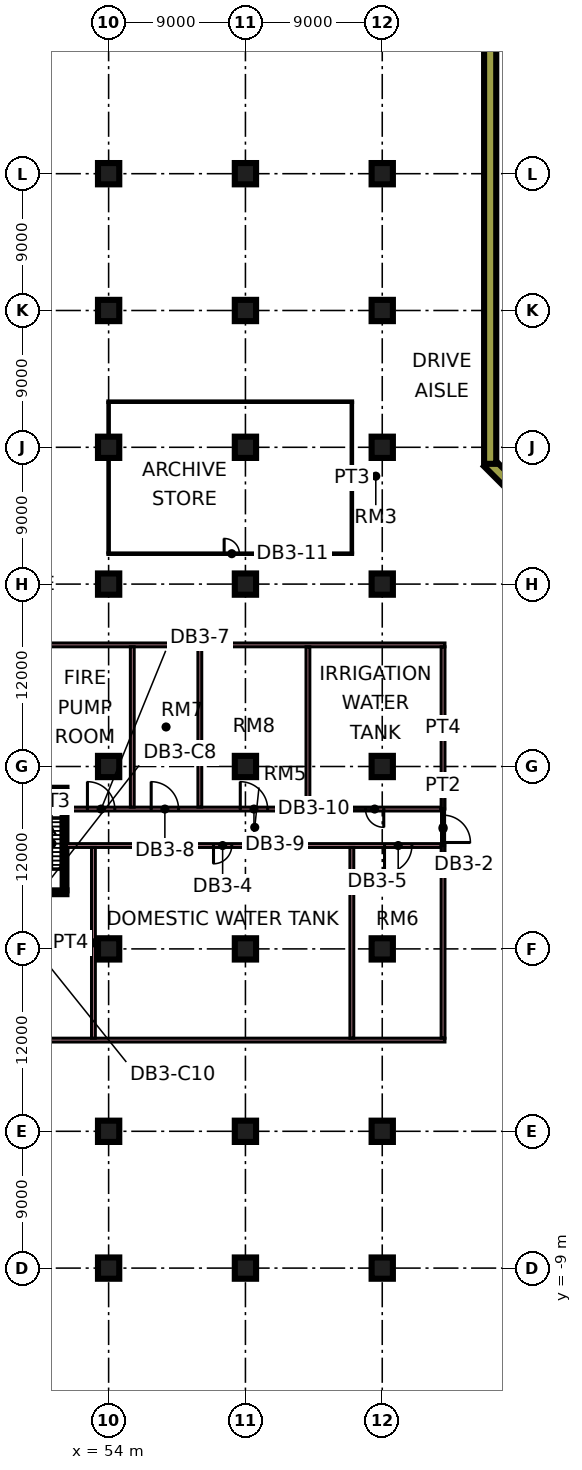
"""IFC4 building model, lengths in metres.
Left out: names, types, materials, properties, quantities, classifications, styles, units other than length and angle.
Written with IfcOpenShell. Run it as: python <this file> out.ifc"""

import sys

from ifc_helpers import new_model, si_unit, direction, frame, frame_2d, origin, origin_2d, place, context, subcontext, project, spatial, rectangle, extrude, element, fill, save


model = new_model("IFC4")
c1 = context("Model", 3, precision=1e-05, world=origin(), true_north=direction((0.0, 1.0)))
c2 = subcontext(c1, "Body", "Model", "MODEL_VIEW")
j1 = project(units=[si_unit("LENGTHUNIT", "METRE"), si_unit("PLANEANGLEUNIT", "RADIAN")], contexts=[c1])
p1 = place(None, origin())
s1 = spatial("IfcSite", under=j1, at=p1, CompositionType="ELEMENT")
p2 = place(p1, origin())
s2 = spatial("IfcBuilding", under=s1, at=p2, CompositionType="ELEMENT")
p3 = place(p2, frame((0.0, 0.0, -13.5)))
s3 = spatial("IfcBuildingStorey", under=s2, at=p3, CompositionType="ELEMENT", Elevation=-13.5)
for number, where, z_axis, x_axis in (
    (1, (54.0, -9.0, 0.0), (0.0, 0.0, 1.0), (1.0, 0.0, 0.0)),
    (2, (54.0, 0.0, 0.0), (0.0, 0.0, 1.0), (1.0, 0.0, 0.0)),
    (3, (54.0, 12.0, 0.0), (0.0, 0.0, 1.0), (1.0, 0.0, 0.0)),
    (4, (54.0, 24.0, 0.0), (0.0, 0.0, 1.0), (1.0, 0.0, 0.0)),
    (5, (54.0, 36.0, 0.0), (0.0, 0.0, 1.0), (1.0, 0.0, 0.0)),
    (6, (54.0, 45.0, 0.0), (0.0, 0.0, 1.0), (1.0, 0.0, 0.0)),
    (7, (54.0, 54.0, 0.0), (0.0, 0.0, 1.0), (1.0, 0.0, 0.0)),
    (8, (54.0, 63.0, 0.0), (0.0, 0.0, 1.0), (1.0, 0.0, 0.0)),
    (9, (63.0, -9.0, 0.0), (0.0, 0.0, 1.0), (1.0, 0.0, 0.0)),
    (10, (63.0, 0.0, 0.0), (0.0, 0.0, 1.0), (1.0, 0.0, 0.0)),
    (11, (63.0, 12.0, 0.0), (0.0, 0.0, 1.0), (1.0, 0.0, 0.0)),
    (12, (63.0, 24.0, 0.0), (0.0, 0.0, 1.0), (1.0, 0.0, 0.0)),
    (13, (63.0, 36.0, 0.0), (0.0, 0.0, 1.0), (1.0, 0.0, 0.0)),
    (14, (63.0, 45.0, 0.0), (0.0, 0.0, 1.0), (1.0, 0.0, 0.0)),
    (15, (63.0, 54.0, 0.0), (0.0, 0.0, 1.0), (1.0, 0.0, 0.0)),
    (16, (63.0, 63.0, 0.0), (0.0, 0.0, 1.0), (1.0, 0.0, 0.0)),
    (17, (72.0, -9.0, 0.0), (0.0, 0.0, 1.0), (1.0, 0.0, 0.0)),
    (18, (72.0, 0.0, 0.0), (0.0, 0.0, 1.0), (1.0, 0.0, 0.0)),
    (19, (72.0, 12.0, 0.0), (0.0, 0.0, 1.0), (1.0, 0.0, 0.0)),
    (20, (72.0, 24.0, 0.0), (0.0, 0.0, 1.0), (1.0, 0.0, 0.0)),
    (21, (72.0, 36.0, 0.0), (0.0, 0.0, 1.0), (1.0, 0.0, 0.0)),
    (22, (72.0, 45.0, 0.0), (0.0, 0.0, 1.0), (1.0, 0.0, 0.0)),
    (23, (72.0, 54.0, 0.0), (0.0, 0.0, 1.0), (1.0, 0.0, 0.0)),
    (24, (72.0, 63.0, 0.0), (0.0, 0.0, 1.0), (1.0, 0.0, 0.0)),
):
    element("IfcColumn", number, at=place(p3, frame(where, z_axis=z_axis, x_axis=x_axis)), inside=s3, PredefinedType="COLUMN", context=c2, shape_type="SweptSolid", body=[
        extrude(rectangle(XDim=1.4, YDim=1.4, at=origin_2d()), origin(), (0.0, 0.0, 1.0), 4.5),
    ])
p4 = place(p3, frame((47.775, 15.725, 0.0), z_axis=(0.0, 0.0, 1.0), x_axis=(1.0, 0.0, 0.0)))
e25 = element("IfcWall", 25, at=p4, inside=s3, PredefinedType="SHEAR", context=c2, shape_type="SweptSolid", body=[
    extrude(rectangle(XDim=3.45, YDim=0.25, at=frame_2d((1.725, 0.0))), origin(), (0.0, 0.0, 1.0), 4.5),
])
p5 = place(p4, frame((1.175, 0.0, 0.0)))
e26 = element("IfcOpeningElement", 26, at=p5, cuts=e25, PredefinedType="OPENING", context=c2, shape_type="SweptSolid", body=[
    extrude(rectangle(XDim=1.1, YDim=2.2, at=frame_2d((0.55, 1.1))), frame((0.0, 0.135, 0.0), z_axis=(0.0, -1.0, 0.0), x_axis=(1.0, 0.0, 0.0)), (0.0, 0.0, 1.0), 0.27),
])
p6 = place(p3, frame((47.775, 22.475, 0.0), z_axis=(0.0, 0.0, 1.0), x_axis=(1.0, 0.0, 0.0)))
e27 = element("IfcWall", 27, at=p6, inside=s3, PredefinedType="SHEAR", context=c2, shape_type="SweptSolid", body=[
    extrude(rectangle(XDim=3.45, YDim=0.25, at=frame_2d((1.725, 0.0))), origin(), (0.0, 0.0, 1.0), 4.5),
])
p7 = place(p3, frame((51.1, 15.85, 0.0), z_axis=(0.0, 0.0, 1.0), x_axis=(0.0, 1.0, 0.0)))
e28 = element("IfcWall", 28, at=p7, inside=s3, PredefinedType="SHEAR", context=c2, shape_type="SweptSolid", body=[
    extrude(rectangle(XDim=6.5, YDim=0.25, at=frame_2d((3.25, 0.0))), origin(), (0.0, 0.0, 1.0), 4.5),
])
p8 = place(p3, frame((78.294, -20.717, 0.0), z_axis=(0.0, 0.0, 1.0), x_axis=(0.707112814855, 0.707100747466, 0.0)))
e29 = element("IfcWall", 29, at=p8, inside=s3, PredefinedType="SOLIDWALL", context=c2, shape_type="SweptSolid", body=[
    extrude(rectangle(XDim=20.231, YDim=0.8, at=frame_2d((10.116, 0.0))), origin(), (0.0, 0.0, 1.0), 4.5),
])
p9 = place(p3, frame((92.717, 30.294, 0.0), z_axis=(0.0, 0.0, 1.0), x_axis=(-0.707106781187, 0.707106781187, 0.0)))
e30 = element("IfcWall", 30, at=p9, inside=s3, PredefinedType="SOLIDWALL", context=c2, shape_type="SweptSolid", body=[
    extrude(rectangle(XDim=19.423, YDim=0.8, at=frame_2d((9.712, 0.0))), origin(), (0.0, 0.0, 1.0), 4.5),
])
p10 = place(p3, frame((79.1, 43.912, 0.0), z_axis=(0.0, 0.0, 1.0), x_axis=(0.0, 1.0, 0.0)))
e31 = element("IfcWall", 31, at=p10, inside=s3, PredefinedType="SOLIDWALL", context=c2, shape_type="SweptSolid", body=[
    extrude(rectangle(XDim=35.188, YDim=0.8, at=frame_2d((17.594, 0.0))), origin(), (0.0, 0.0, 1.0), 4.5),
])
p11 = place(p3, frame((35.875, 32.0, 0.0), z_axis=(0.0, 0.0, 1.0), x_axis=(1.0, 0.0, 0.0)))
e32 = element("IfcWall", 32, at=p11, inside=s3, PredefinedType="PARTITIONING", context=c2, shape_type="SweptSolid", body=[
    extrude(rectangle(XDim=40.25, YDim=0.25, at=frame_2d((20.125, 0.0))), origin(), (0.0, 0.0, 1.0), 4.05),
])
p12 = place(p3, frame((40.65, 6.0, 0.0), z_axis=(0.0, 0.0, 1.0), x_axis=(1.0, 0.0, 0.0)))
e33 = element("IfcWall", 33, at=p12, inside=s3, PredefinedType="PARTITIONING", context=c2, shape_type="SweptSolid", body=[
    extrude(rectangle(XDim=35.475, YDim=0.25, at=frame_2d((17.738, 0.0))), origin(), (0.0, 0.0, 1.0), 4.05),
])
p13 = place(p3, frame((51.225, 18.8, 0.0), z_axis=(0.0, 0.0, 1.0), x_axis=(1.0, 0.0, 0.0)))
e34 = element("IfcWall", 34, at=p13, inside=s3, PredefinedType="PARTITIONING", context=c2, shape_type="SweptSolid", body=[
    extrude(rectangle(XDim=24.65, YDim=0.25, at=frame_2d((12.325, 0.0))), origin(), (0.0, 0.0, 1.0), 4.05),
])
p14 = place(p13, frame((9.675, 0.0, 0.0)))
e35 = element("IfcOpeningElement", 35, at=p14, cuts=e34, PredefinedType="OPENING", context=c2, shape_type="SweptSolid", body=[
    extrude(rectangle(XDim=1.2, YDim=2.1, at=frame_2d((0.6, 1.05))), frame((0.0, 0.135, 0.0), z_axis=(0.0, -1.0, 0.0), x_axis=(1.0, 0.0, 0.0)), (0.0, 0.0, 1.0), 0.27),
])
p15 = place(p13, frame((20.925, 0.0, 0.0)))
e36 = element("IfcOpeningElement", 36, at=p15, cuts=e34, PredefinedType="OPENING", context=c2, shape_type="SweptSolid", body=[
    extrude(rectangle(XDim=1.8, YDim=2.1, at=frame_2d((0.9, 1.05))), frame((0.0, 0.135, 0.0), z_axis=(0.0, -1.0, 0.0), x_axis=(1.0, 0.0, 0.0)), (0.0, 0.0, 1.0), 0.27),
])
p16 = place(p3, frame((51.225, 21.2, 0.0), z_axis=(0.0, 0.0, 1.0), x_axis=(1.0, 0.0, 0.0)))
e37 = element("IfcWall", 37, at=p16, inside=s3, PredefinedType="PARTITIONING", context=c2, shape_type="SweptSolid", body=[
    extrude(rectangle(XDim=24.65, YDim=0.25, at=frame_2d((12.325, 0.0))), origin(), (0.0, 0.0, 1.0), 4.05),
])
p17 = place(p16, frame((1.381, 0.0, 0.0)))
e38 = element("IfcOpeningElement", 38, at=p17, cuts=e37, PredefinedType="OPENING", context=c2, shape_type="SweptSolid", body=[
    extrude(rectangle(XDim=1.8, YDim=2.1, at=frame_2d((0.9, 1.05))), frame((0.0, 0.135, 0.0), z_axis=(0.0, -1.0, 0.0), x_axis=(1.0, 0.0, 0.0)), (0.0, 0.0, 1.0), 0.27),
])
p18 = place(p16, frame((5.575, 0.0, 0.0)))
e39 = element("IfcOpeningElement", 39, at=p18, cuts=e37, PredefinedType="OPENING", context=c2, shape_type="SweptSolid", body=[
    extrude(rectangle(XDim=1.8, YDim=2.1, at=frame_2d((0.9, 1.05))), frame((0.0, 0.135, 0.0), z_axis=(0.0, -1.0, 0.0), x_axis=(1.0, 0.0, 0.0)), (0.0, 0.0, 1.0), 0.27),
])
p19 = place(p16, frame((11.436, 0.0, 0.0)))
e40 = element("IfcOpeningElement", 40, at=p19, cuts=e37, PredefinedType="OPENING", context=c2, shape_type="SweptSolid", body=[
    extrude(rectangle(XDim=1.8, YDim=2.1, at=frame_2d((0.9, 1.05))), frame((0.0, 0.135, 0.0), z_axis=(0.0, -1.0, 0.0), x_axis=(1.0, 0.0, 0.0)), (0.0, 0.0, 1.0), 0.27),
])
p20 = place(p16, frame((19.675, 0.0, 0.0)))
e41 = element("IfcOpeningElement", 41, at=p20, cuts=e37, PredefinedType="OPENING", context=c2, shape_type="SweptSolid", body=[
    extrude(rectangle(XDim=1.2, YDim=2.1, at=frame_2d((0.6, 1.05))), frame((0.0, 0.135, 0.0), z_axis=(0.0, -1.0, 0.0), x_axis=(1.0, 0.0, 0.0)), (0.0, 0.0, 1.0), 0.27),
])
p21 = place(p3, frame((53.0, 6.125, 0.0), z_axis=(0.0, 0.0, 1.0), x_axis=(0.0, 1.0, 0.0)))
e42 = element("IfcWall", 42, at=p21, inside=s3, PredefinedType="PARTITIONING", context=c2, shape_type="SweptSolid", body=[
    extrude(rectangle(XDim=12.55, YDim=0.25, at=frame_2d((6.275, 0.0))), origin(), (0.0, 0.0, 1.0), 4.05),
])
p22 = place(p3, frame((53.95, 38.0, 0.0), z_axis=(0.0, 0.0, 1.0), x_axis=(1.0, 0.0, 0.0)))
e43 = element("IfcWall", 43, at=p22, inside=s3, PredefinedType="PARTITIONING", context=c2, shape_type="SweptSolid", body=[
    extrude(rectangle(XDim=16.1, YDim=0.1, at=frame_2d((8.05, 0.0))), origin(), (0.0, 0.0, 1.0), 4.05),
])
p23 = place(p22, frame((7.65, 0.0, 0.0)))
e44 = element("IfcOpeningElement", 44, at=p23, cuts=e43, PredefinedType="OPENING", context=c2, shape_type="SweptSolid", body=[
    extrude(rectangle(XDim=1.0, YDim=2.1, at=frame_2d((0.5, 1.05))), frame((0.0, 0.06, 0.0), z_axis=(0.0, -1.0, 0.0), x_axis=(1.0, 0.0, 0.0)), (0.0, 0.0, 1.0), 0.12),
])
p24 = place(p3, frame((53.95, 48.0, 0.0), z_axis=(0.0, 0.0, 1.0), x_axis=(1.0, 0.0, 0.0)))
e45 = element("IfcWall", 45, at=p24, inside=s3, PredefinedType="PARTITIONING", context=c2, shape_type="SweptSolid", body=[
    extrude(rectangle(XDim=16.1, YDim=0.1, at=frame_2d((8.05, 0.0))), origin(), (0.0, 0.0, 1.0), 4.05),
])
p25 = place(p3, frame((54.0, 38.05, 0.0), z_axis=(0.0, 0.0, 1.0), x_axis=(0.0, 1.0, 0.0)))
e46 = element("IfcWall", 46, at=p25, inside=s3, PredefinedType="PARTITIONING", context=c2, shape_type="SweptSolid", body=[
    extrude(rectangle(XDim=6.251, YDim=0.1, at=frame_2d((3.125, 0.0))), origin(), (0.0, 0.0, 1.0), 4.05),
])
p26 = place(p3, frame((54.0, 45.699, 0.0), z_axis=(0.0, 0.0, 1.0), x_axis=(0.0, 1.0, 0.0)))
e47 = element("IfcWall", 47, at=p26, inside=s3, PredefinedType="PARTITIONING", context=c2, shape_type="SweptSolid", body=[
    extrude(rectangle(XDim=2.251, YDim=0.1, at=frame_2d((1.125, 0.0))), origin(), (0.0, 0.0, 1.0), 4.05),
])
for number, where, z_axis, x_axis in (
    (48, (55.556, 21.325, 0.0), (0.0, 0.0, 1.0), (0.0, 1.0, 0.0)),
    (49, (60.0, 21.325, 0.0), (0.0, 0.0, 1.0), (0.0, 1.0, 0.0)),
    (50, (67.111, 21.325, 0.0), (0.0, 0.0, 1.0), (0.0, 1.0, 0.0)),
):
    element("IfcWall", number, at=place(p3, frame(where, z_axis=z_axis, x_axis=x_axis)), inside=s3, PredefinedType="PARTITIONING", context=c2, shape_type="SweptSolid", body=[
        extrude(rectangle(XDim=10.55, YDim=0.25, at=frame_2d((5.275, 0.0))), origin(), (0.0, 0.0, 1.0), 4.05),
    ])
p27 = place(p3, frame((70.0, 6.125, 0.0), z_axis=(0.0, 0.0, 1.0), x_axis=(0.0, 1.0, 0.0)))
e51 = element("IfcWall", 51, at=p27, inside=s3, PredefinedType="PARTITIONING", context=c2, shape_type="SweptSolid", body=[
    extrude(rectangle(XDim=12.55, YDim=0.25, at=frame_2d((6.275, 0.0))), origin(), (0.0, 0.0, 1.0), 4.05),
])
p28 = place(p3, frame((70.0, 38.05, 0.0), z_axis=(0.0, 0.0, 1.0), x_axis=(0.0, 1.0, 0.0)))
e52 = element("IfcWall", 52, at=p28, inside=s3, PredefinedType="PARTITIONING", context=c2, shape_type="SweptSolid", body=[
    extrude(rectangle(XDim=9.9, YDim=0.1, at=frame_2d((4.95, 0.0))), origin(), (0.0, 0.0, 1.0), 4.05),
])
p29 = place(p3, frame((76.0, 6.125, 0.0), z_axis=(0.0, 0.0, 1.0), x_axis=(0.0, 1.0, 0.0)))
e53 = element("IfcWall", 53, at=p29, inside=s3, PredefinedType="PARTITIONING", context=c2, shape_type="SweptSolid", body=[
    extrude(rectangle(XDim=12.675, YDim=0.25, at=frame_2d((6.337, 0.0))), origin(), (0.0, 0.0, 1.0), 4.05),
])
p30 = place(p3, frame((76.0, 18.8, 0.0), z_axis=(0.0, 0.0, 1.0), x_axis=(0.0, 1.0, 0.0)))
e54 = element("IfcWall", 54, at=p30, inside=s3, PredefinedType="PARTITIONING", context=c2, shape_type="SweptSolid", body=[
    extrude(rectangle(XDim=2.4, YDim=0.2, at=frame_2d((1.2, 0.0))), origin(), (0.0, 0.0, 1.0), 4.05),
])
p31 = place(p30, frame((0.2, 0.0, 0.0)))
e55 = element("IfcOpeningElement", 55, at=p31, cuts=e54, PredefinedType="OPENING", context=c2, shape_type="SweptSolid", body=[
    extrude(rectangle(XDim=1.8, YDim=2.1, at=frame_2d((0.9, 1.05))), frame((0.0, 0.11, 0.0), z_axis=(0.0, -1.0, 0.0), x_axis=(1.0, 0.0, 0.0)), (0.0, 0.0, 1.0), 0.22),
])
p32 = place(p3, frame((76.0, 21.2, 0.0), z_axis=(0.0, 0.0, 1.0), x_axis=(0.0, 1.0, 0.0)))
e56 = element("IfcWall", 56, at=p32, inside=s3, PredefinedType="PARTITIONING", context=c2, shape_type="SweptSolid", body=[
    extrude(rectangle(XDim=10.675, YDim=0.25, at=frame_2d((5.337, 0.0))), origin(), (0.0, 0.0, 1.0), 4.05),
])
p33 = place(p31, frame((1.8, 0.0, 0.0), z_axis=(0.0, 0.0, 1.0), x_axis=(-1.0, 0.0, 0.0)))
e57 = element("IfcDoor", 57, at=p33, inside=s3, OperationType="DOUBLE_DOOR_SINGLE_SWING", PredefinedType="DOOR", context=c2, shape_type="SweptSolid", body=[
    extrude(rectangle(XDim=1.8, YDim=2.1, at=frame_2d((0.9, 1.05))), frame((0.0, 0.025, 0.0), z_axis=(0.0, -1.0, 0.0), x_axis=(1.0, 0.0, 0.0)), (0.0, 0.0, 1.0), 0.05),
])
fill(e55, e57)
p34 = place(p14, frame((1.2, 0.0, 0.0), z_axis=(0.0, 0.0, 1.0), x_axis=(-1.0, 0.0, 0.0)))
e58 = element("IfcDoor", 58, at=p34, inside=s3, OperationType="SINGLE_SWING_LEFT", PredefinedType="DOOR", context=c2, shape_type="SweptSolid", body=[
    extrude(rectangle(XDim=1.2, YDim=2.1, at=frame_2d((0.6, 1.05))), frame((0.0, 0.025, 0.0), z_axis=(0.0, -1.0, 0.0), x_axis=(1.0, 0.0, 0.0)), (0.0, 0.0, 1.0), 0.05),
])
fill(e35, e58)
p35 = place(p15, frame((1.8, 0.0, 0.0), z_axis=(0.0, 0.0, 1.0), x_axis=(-1.0, 0.0, 0.0)))
e59 = element("IfcDoor", 59, at=p35, inside=s3, OperationType="DOUBLE_DOOR_SINGLE_SWING", PredefinedType="DOOR", context=c2, shape_type="SweptSolid", body=[
    extrude(rectangle(XDim=1.8, YDim=2.1, at=frame_2d((0.9, 1.05))), frame((0.0, 0.025, 0.0), z_axis=(0.0, -1.0, 0.0), x_axis=(1.0, 0.0, 0.0)), (0.0, 0.0, 1.0), 0.05),
])
fill(e36, e59)
p36 = place(p17, origin())
e60 = element("IfcDoor", 60, at=p36, inside=s3, OperationType="DOUBLE_DOOR_SINGLE_SWING", PredefinedType="DOOR", context=c2, shape_type="SweptSolid", body=[
    extrude(rectangle(XDim=1.8, YDim=2.1, at=frame_2d((0.9, 1.05))), frame((0.0, 0.025, 0.0), z_axis=(0.0, -1.0, 0.0), x_axis=(1.0, 0.0, 0.0)), (0.0, 0.0, 1.0), 0.05),
])
fill(e38, e60)
p37 = place(p18, origin())
e61 = element("IfcDoor", 61, at=p37, inside=s3, OperationType="DOUBLE_DOOR_SINGLE_SWING", PredefinedType="DOOR", context=c2, shape_type="SweptSolid", body=[
    extrude(rectangle(XDim=1.8, YDim=2.1, at=frame_2d((0.9, 1.05))), frame((0.0, 0.025, 0.0), z_axis=(0.0, -1.0, 0.0), x_axis=(1.0, 0.0, 0.0)), (0.0, 0.0, 1.0), 0.05),
])
fill(e39, e61)
p38 = place(p19, origin())
e62 = element("IfcDoor", 62, at=p38, inside=s3, OperationType="DOUBLE_DOOR_SINGLE_SWING", PredefinedType="DOOR", context=c2, shape_type="SweptSolid", body=[
    extrude(rectangle(XDim=1.8, YDim=2.1, at=frame_2d((0.9, 1.05))), frame((0.0, 0.025, 0.0), z_axis=(0.0, -1.0, 0.0), x_axis=(1.0, 0.0, 0.0)), (0.0, 0.0, 1.0), 0.05),
])
fill(e40, e62)
p39 = place(p20, origin())
e63 = element("IfcDoor", 63, at=p39, inside=s3, OperationType="SINGLE_SWING_RIGHT", PredefinedType="DOOR", context=c2, shape_type="SweptSolid", body=[
    extrude(rectangle(XDim=1.2, YDim=2.1, at=frame_2d((0.6, 1.05))), frame((0.0, 0.025, 0.0), z_axis=(0.0, -1.0, 0.0), x_axis=(1.0, 0.0, 0.0)), (0.0, 0.0, 1.0), 0.05),
])
fill(e41, e63)
p40 = place(p23, origin())
e64 = element("IfcDoor", 64, at=p40, inside=s3, OperationType="SINGLE_SWING_LEFT", PredefinedType="DOOR", context=c2, shape_type="SweptSolid", body=[
    extrude(rectangle(XDim=1.0, YDim=2.1, at=frame_2d((0.5, 1.05))), frame((0.0, 0.025, 0.0), z_axis=(0.0, -1.0, 0.0), x_axis=(1.0, 0.0, 0.0)), (0.0, 0.0, 1.0), 0.05),
])
fill(e44, e64)
save(model, sys.argv[1])
